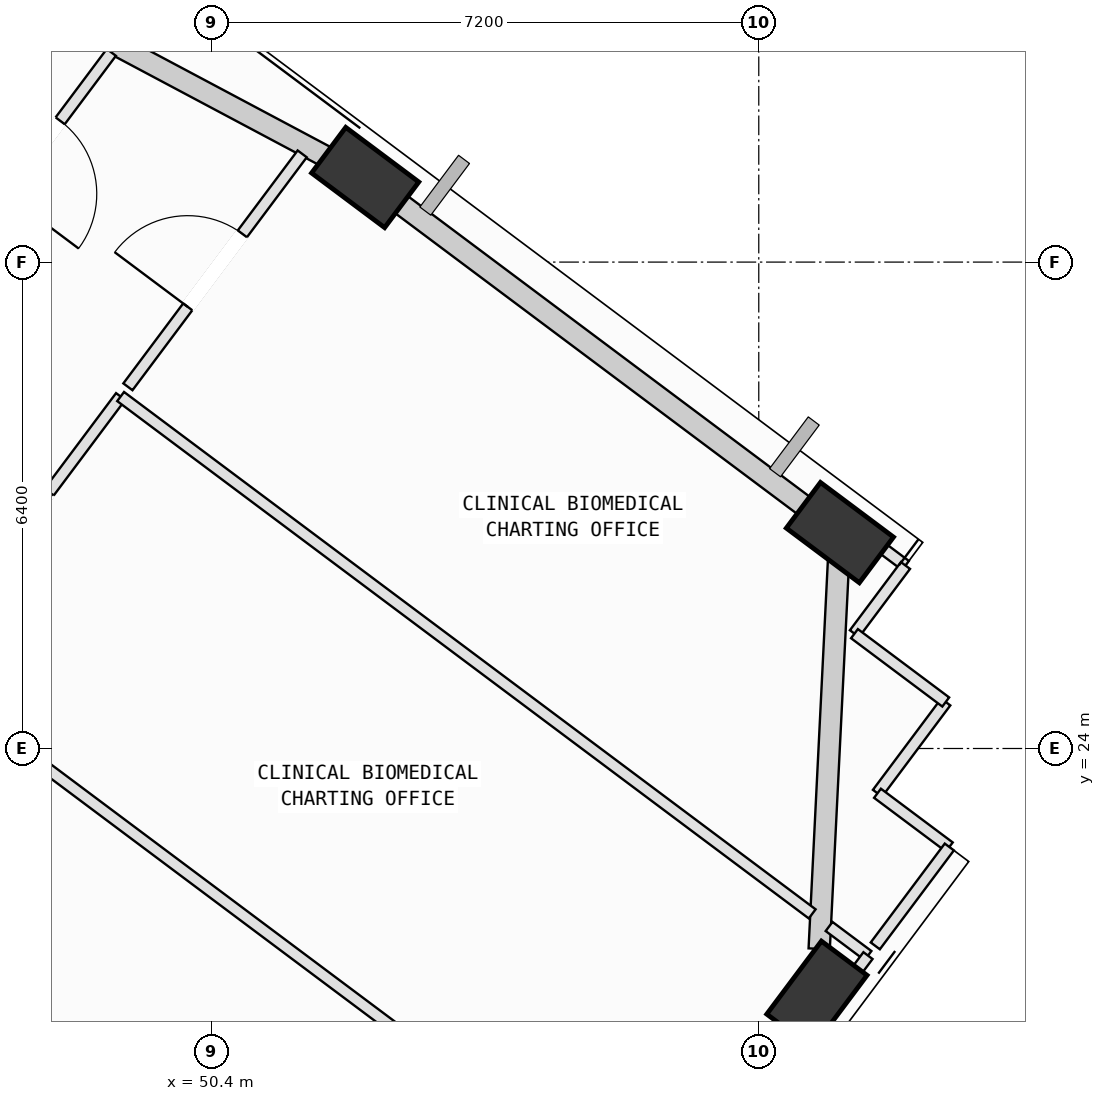
"""IFC4 building model, lengths in metres.
Left out: names, types, materials, properties, quantities, classifications, styles, units other than length and angle.
Written with IfcOpenShell. Run it as: python <this file> out.ifc"""

import sys

from ifc_helpers import new_model, si_unit, direction, frame, frame_2d, origin, origin_2d, place, context, subcontext, project, spatial, rectangle, extrude, element, fill, save


model = new_model("IFC4")
c1 = context("Model", 3, precision=1e-05, world=origin(), true_north=direction((0.0, 1.0)))
c2 = subcontext(c1, "Body", "Model", "MODEL_VIEW")
j1 = project(units=[si_unit("LENGTHUNIT", "METRE"), si_unit("PLANEANGLEUNIT", "RADIAN")], contexts=[c1])
p1 = place(None, origin())
s1 = spatial("IfcSite", under=j1, at=p1, CompositionType="ELEMENT")
p2 = place(p1, origin())
s2 = spatial("IfcBuilding", under=s1, at=p2, CompositionType="ELEMENT")
p3 = place(p2, frame((0.0, 0.0, 251.2)))
s3 = spatial("IfcBuildingStorey", under=s2, at=p3, CompositionType="ELEMENT", Elevation=251.2)
p4 = place(p3, frame((58.365, 20.76, 0.002), z_axis=(0.015798513872, 0.102204232052, 0.994637975301), x_axis=(-0.713659401151, -0.695580870268, 0.082810096407)))
e1 = element("IfcColumn", 1, at=p4, inside=s3, PredefinedType="COLUMN", context=c2, shape_type="SweptSolid", body=[
    extrude(rectangle(XDim=1.2, YDim=0.75, at=origin_2d()), origin(), (0.0, 0.0, 1.0), 4.018),
])
p5 = place(p3, frame((58.667, 26.841, 0.002), z_axis=(-0.009235832937, 0.103234737891, 0.994614140399), x_axis=(0.850636606245, -0.522075248116, 0.062087031016)))
e2 = element("IfcColumn", 2, at=p5, inside=s3, PredefinedType="COLUMN", context=c2, shape_type="SweptSolid", body=[
    extrude(rectangle(XDim=1.2, YDim=0.75, at=origin_2d()), origin(), (0.0, 0.0, 1.0), 4.018),
])
p6 = place(p3, frame((52.422, 31.513, 0.002), z_axis=(-0.028371320881, 0.077503629788, 0.996588307939), x_axis=(0.957149453601, -0.285343074495, 0.049439390263)))
e3 = element("IfcColumn", 3, at=p6, inside=s3, PredefinedType="COLUMN", context=c2, shape_type="SweptSolid", body=[
    extrude(rectangle(XDim=1.2, YDim=0.75, at=origin_2d()), origin(), (0.0, 0.0, 1.0), 4.01),
])
p7 = place(p3, frame((58.244, 20.599, 0.0), z_axis=(0.0, 0.0, 1.0), x_axis=(-0.599019695529, -0.800734290741, 0.0)))
e4 = element("IfcWall", 4, at=p7, inside=s3, PredefinedType="SOLIDWALL", context=c2, shape_type="SweptSolid", body=[
    extrude(rectangle(XDim=6.418, YDim=0.28, at=frame_2d((3.209, 0.0))), origin(), (0.0, 0.0, 1.0), 3.265),
])
p8 = place(p7, frame((0.76, 0.0, 0.75)))
e5 = element("IfcOpeningElement", 5, at=p8, cuts=e4, PredefinedType="OPENING", context=c2, shape_type="SweptSolid", body=[
    extrude(rectangle(XDim=1.6, YDim=1.95, at=frame_2d((0.8, 0.975))), frame((0.0, 0.15, 0.0), z_axis=(0.0, -1.0, 0.0), x_axis=(1.0, 0.0, 0.0)), (0.0, 0.0, 1.0), 0.3),
])
p9 = place(p3, frame((58.658, 26.651, 0.0), z_axis=(0.0, 0.0, 1.0), x_axis=(-0.049712214563, -0.998763583499, 0.0)))
e6 = element("IfcWall", 6, at=p9, inside=s3, PredefinedType="SOLIDWALL", context=c2, shape_type="SweptSolid", body=[
    extrude(rectangle(XDim=5.294, YDim=0.28, at=frame_2d((2.647, 0.0))), origin(), (0.0, 0.0, 1.0), 3.265),
])
p10 = place(p3, frame((52.621, 31.364, 0.0), z_axis=(0.0, 0.0, 1.0), x_axis=(0.800735308346, -0.599018335252, 0.0)))
e7 = element("IfcWall", 7, at=p10, inside=s3, PredefinedType="SOLIDWALL", context=c2, shape_type="SweptSolid", body=[
    extrude(rectangle(XDim=7.046, YDim=0.28, at=frame_2d((3.523, 0.0))), origin(), (0.0, 0.0, 1.0), 3.265),
])
p11 = place(p3, frame((43.998, 35.994, 0.0), z_axis=(0.0, 0.0, 1.0), x_axis=(0.88287143587, -0.469614765233, 0.0)))
e8 = element("IfcWall", 8, at=p11, inside=s3, PredefinedType="SOLIDWALL", context=c2, shape_type="SweptSolid", body=[
    extrude(rectangle(XDim=9.036, YDim=0.28, at=frame_2d((4.518, 0.0))), origin(), (0.0, 0.0, 1.0), 3.265),
])
p12 = place(p3, frame((43.813, 21.424, 0.0), z_axis=(0.0, 0.0, 1.0), x_axis=(0.800750498609, -0.598998029193, 0.0)))
e9 = element("IfcWall", 9, at=p12, inside=s3, PredefinedType="PARTITIONING", context=c2, shape_type="SweptSolid", body=[
    extrude(rectangle(XDim=11.935, YDim=0.15, at=frame_2d((5.968, 0.0))), origin(), (0.0, 0.0, 1.0), 3.78),
])
p13 = place(p3, frame((46.509, 25.028, 0.0), z_axis=(0.0, 0.0, 1.0), x_axis=(0.800743159028, -0.599007840741, 0.0)))
e10 = element("IfcWall", 10, at=p13, inside=s3, PredefinedType="PARTITIONING", context=c2, shape_type="SweptSolid", body=[
    extrude(rectangle(XDim=11.935, YDim=0.15, at=frame_2d((5.968, 0.0))), origin(), (0.0, 0.0, 1.0), 3.78),
])
p14 = place(p3, frame((46.605, 25.156, 0.0), z_axis=(0.0, 0.0, 1.0), x_axis=(0.598937294168, 0.800795927596, 0.0)))
e11 = element("IfcWall", 11, at=p14, inside=s3, PredefinedType="PARTITIONING", context=c2, shape_type="SweptSolid", body=[
    extrude(rectangle(XDim=4.34, YDim=0.15, at=frame_2d((2.17, 0.0))), origin(), (0.0, 0.0, 1.0), 3.78),
])
p15 = place(p14, frame((1.57, 0.0, 0.0)))
e12 = element("IfcOpeningElement", 12, at=p15, cuts=e11, PredefinedType="OPENING", context=c2, shape_type="SweptSolid", body=[
    extrude(rectangle(XDim=1.2, YDim=2.15, at=frame_2d((0.6, 1.075))), frame((0.0, 0.085, 0.0), z_axis=(0.0, -1.0, 0.0), x_axis=(1.0, 0.0, 0.0)), (0.0, 0.0, 1.0), 0.17),
])
p16 = place(p3, frame((49.204, 28.631, 0.0), z_axis=(0.0, 0.0, 1.0), x_axis=(0.800718737754, -0.599040485284, 0.0)))
e13 = element("IfcWall", 13, at=p16, inside=s3, PredefinedType="PARTITIONING", context=c2, shape_type="SweptSolid", body=[
    extrude(rectangle(XDim=11.363, YDim=0.15, at=frame_2d((5.682, 0.0))), origin(), (0.0, 0.0, 1.0), 3.78),
])
p17 = place(p3, frame((58.525, 21.658, 0.0), z_axis=(0.0, 0.0, 1.0), x_axis=(0.800823734326, -0.598900113993, 0.0)))
e14 = element("IfcWall", 14, at=p17, inside=s3, PredefinedType="PARTITIONING", context=c2, shape_type="SweptSolid", body=[
    extrude(rectangle(XDim=0.64, YDim=0.15, at=frame_2d((0.32, 0.0))), origin(), (0.0, 0.0, 1.0), 3.78),
])
p18 = place(p3, frame((59.037, 21.275, 0.0), z_axis=(0.0, 0.0, 1.0), x_axis=(-0.599154365117, -0.800633528377, 0.0)))
e15 = element("IfcWall", 15, at=p18, inside=s3, PredefinedType="PARTITIONING", context=c2, shape_type="SweptSolid", body=[
    extrude(rectangle(XDim=1.017, YDim=0.15, at=frame_2d((0.508, 0.0))), origin(), (0.0, 0.0, 1.0), 3.265),
])
p19 = place(p3, frame((60.06, 24.612, 0.0), z_axis=(0.0, 0.0, 1.0), x_axis=(-0.598749024632, -0.800936705054, 0.0)))
e16 = element("IfcWall", 16, at=p19, inside=s3, PredefinedType="PARTITIONING", context=c2, shape_type="SweptSolid", body=[
    extrude(rectangle(XDim=1.5, YDim=0.15, at=frame_2d((0.75, 0.0))), origin(), (0.0, 0.0, 1.0), 3.78),
])
p20 = place(p3, frame((59.162, 23.411, 0.0), z_axis=(0.0, 0.0, 1.0), x_axis=(0.80074426189, -0.599006366452, 0.0)))
e17 = element("IfcWall", 17, at=p20, inside=s3, PredefinedType="PARTITIONING", context=c2, shape_type="SweptSolid", body=[
    extrude(rectangle(XDim=1.18, YDim=0.15, at=frame_2d((0.59, 0.0))), origin(), (0.0, 0.0, 1.0), 3.78),
])
p21 = place(p3, frame((60.107, 22.704, 0.0), z_axis=(0.0, 0.0, 1.0), x_axis=(-0.599254614929, -0.800558496605, 0.0)))
e18 = element("IfcWall", 18, at=p21, inside=s3, PredefinedType="PARTITIONING", context=c2, shape_type="SweptSolid", body=[
    extrude(rectangle(XDim=1.625, YDim=0.15, at=frame_2d((0.812, 0.0))), origin(), (0.0, 0.0, 1.0), 3.78),
])
p22 = place(p3, frame((49.3, 28.759, 0.0), z_axis=(0.0, 0.0, 1.0), x_axis=(0.599040287777, 0.800718885515, 0.0)))
e19 = element("IfcWall", 19, at=p22, inside=s3, PredefinedType="PARTITIONING", context=c2, shape_type="SweptSolid", body=[
    extrude(rectangle(XDim=3.828, YDim=0.15, at=frame_2d((1.914, 0.0))), origin(), (0.0, 0.0, 1.0), 3.78),
])
p23 = place(p22, frame((1.314, 0.0, 0.0)))
e20 = element("IfcOpeningElement", 20, at=p23, cuts=e19, PredefinedType="OPENING", context=c2, shape_type="SweptSolid", body=[
    extrude(rectangle(XDim=1.2, YDim=2.15, at=frame_2d((0.6, 1.075))), frame((0.0, 0.085, 0.0), z_axis=(0.0, -1.0, 0.0), x_axis=(1.0, 0.0, 0.0)), (0.0, 0.0, 1.0), 0.17),
])
p24 = place(p3, frame((52.093, 31.971, 0.0), z_axis=(0.0, 0.0, 1.0), x_axis=(0.800447232512, -0.59940322652, 0.0)))
e21 = element("IfcWall", 21, at=p24, inside=s3, PredefinedType="PARTITIONING", context=c2, shape_type="SweptSolid", body=[
    extrude(rectangle(XDim=0.786, YDim=0.15, at=frame_2d((0.393, 0.0))), origin(), (0.0, 0.0, 1.0), 3.265),
])
p25 = place(p3, frame((58.365, 27.28, 0.0), z_axis=(0.0, 0.0, 1.0), x_axis=(0.800563329436, -0.59924815858, 0.0)))
e22 = element("IfcWall", 22, at=p25, inside=s3, PredefinedType="PARTITIONING", context=c2, shape_type="SweptSolid", body=[
    extrude(rectangle(XDim=1.455, YDim=0.15, at=frame_2d((0.728, 0.0))), origin(), (0.0, 0.0, 1.0), 3.265),
])
p26 = place(p3, frame((59.53, 26.408, 0.0), z_axis=(0.0, 0.0, 1.0), x_axis=(-0.599093020706, -0.800679431821, 0.0)))
e23 = element("IfcWall", 23, at=p26, inside=s3, PredefinedType="PARTITIONING", context=c2, shape_type="SweptSolid", body=[
    extrude(rectangle(XDim=1.12, YDim=0.15, at=frame_2d((0.56, 0.0))), origin(), (0.0, 0.0, 1.0), 3.78),
])
p27 = place(p3, frame((58.859, 25.511, 0.0), z_axis=(0.0, 0.0, 1.0), x_axis=(0.800624443757, -0.599166504454, 0.0)))
e24 = element("IfcWall", 24, at=p27, inside=s3, PredefinedType="PARTITIONING", context=c2, shape_type="SweptSolid", body=[
    extrude(rectangle(XDim=1.5, YDim=0.15, at=frame_2d((0.75, 0.0))), origin(), (0.0, 0.0, 1.0), 3.78),
])
p28 = place(p3, frame((49.082, 33.159, 0.0), z_axis=(0.0, 0.0, 1.0), x_axis=(-0.598923123133, -0.800806526308, 0.0)))
e25 = element("IfcWall", 25, at=p28, inside=s3, PredefinedType="PARTITIONING", context=c2, shape_type="SweptSolid", body=[
    extrude(rectangle(XDim=3.448, YDim=0.15, at=frame_2d((1.724, 0.0))), origin(), (0.0, 0.0, 1.0), 3.78),
])
p29 = place(p28, frame((1.124, 0.0, 0.0)))
e26 = element("IfcOpeningElement", 26, at=p29, cuts=e25, PredefinedType="OPENING", context=c2, shape_type="SweptSolid", body=[
    extrude(rectangle(XDim=1.2, YDim=2.15, at=frame_2d((0.6, 1.075))), frame((0.0, 0.085, 0.0), z_axis=(0.0, -1.0, 0.0), x_axis=(1.0, 0.0, 0.0)), (0.0, 0.0, 1.0), 0.17),
])
p30 = place(p23, origin())
e27 = element("IfcDoor", 27, at=p30, inside=s3, OperationType="SINGLE_SWING_LEFT", PredefinedType="DOOR", context=c2, shape_type="SweptSolid", body=[
    extrude(rectangle(XDim=1.2, YDim=2.15, at=frame_2d((0.6, 1.075))), frame((0.0, 0.025, 0.0), z_axis=(0.0, -1.0, 0.0), x_axis=(1.0, 0.0, 0.0)), (0.0, 0.0, 1.0), 0.05),
])
fill(e20, e27)
p31 = place(p29, origin())
e28 = element("IfcDoor", 28, at=p31, inside=s3, OperationType="SINGLE_SWING_RIGHT", PredefinedType="DOOR", context=c2, shape_type="SweptSolid", body=[
    extrude(rectangle(XDim=1.2, YDim=2.15, at=frame_2d((0.6, 1.075))), frame((0.0, 0.025, 0.0), z_axis=(0.0, -1.0, 0.0), x_axis=(1.0, 0.0, 0.0)), (0.0, 0.0, 1.0), 0.05),
])
fill(e26, e28)
save(model, sys.argv[1])
